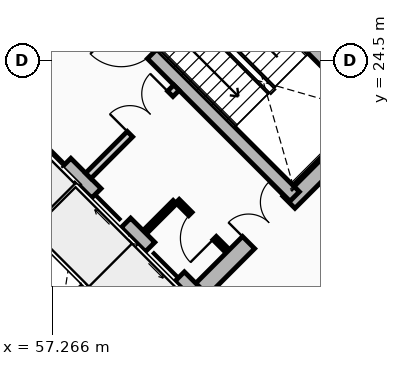
"""IFC4 building model, lengths in metres.
Left out: names, types, materials, properties, quantities, classifications, styles, units other than length and angle.
Written with IfcOpenShell. Run it as: python <this file> out.ifc"""

import sys

from ifc_helpers import new_model, si_unit, direction, frame, frame_2d, origin, place, context, subcontext, project, spatial, rectangle, extrude, source, transform, mapped, element, fill, save


model = new_model("IFC4")
c1 = context("Model", 3, precision=1e-05, world=origin(), true_north=direction((0.0, 1.0)))
c2 = subcontext(c1, "Body", "Model", "MODEL_VIEW")
j1 = project(units=[si_unit("LENGTHUNIT", "METRE"), si_unit("PLANEANGLEUNIT", "RADIAN")], contexts=[c1])
p1 = place(None, origin())
s1 = spatial("IfcSite", under=j1, at=p1, CompositionType="ELEMENT")
p2 = place(p1, origin())
s2 = spatial("IfcBuilding", under=s1, at=p2, CompositionType="ELEMENT")
p3 = place(p2, frame((0.0, 0.0, 136.6)))
s3 = spatial("IfcBuildingStorey", under=s2, at=p3, CompositionType="ELEMENT", Elevation=136.6)
for number, where, z_axis, x_axis in (
    (1, (58.737, 15.697, 0.0), (0.0, 0.0, 1.0), (-0.707, 0.707, 0.0)),
    (2, (66.303, 23.263, 0.0), (0.0, 0.0, 1.0), (-0.707, 0.707, 0.0)),
):
    element("IfcWall", number, at=place(p3, frame(where, z_axis=z_axis, x_axis=x_axis)), inside=s3, PredefinedType="SHEAR", context=c2, shape_type="SweptSolid", body=[
        extrude(rectangle(XDim=14.2, YDim=0.45, at=frame_2d((7.1, 0.0))), origin(), (0.0, 0.0, 1.0), 3.72),
    ])
p4 = place(p3, frame((58.578, 15.856, 0.0), z_axis=(0.0, 0.0, 1.0), x_axis=(0.707106781187, 0.707106781187, 0.0)))
e3 = element("IfcWall", 3, at=p4, inside=s3, PredefinedType="SHEAR", context=c2, shape_type="SweptSolid", body=[
    extrude(rectangle(XDim=10.7, YDim=0.45, at=frame_2d((5.35, 0.0))), origin(), (0.0, 0.0, 1.0), 3.72),
])
m1 = source(origin(), c2, "Body", "SweptSolid", [
    extrude(rectangle(XDim=1.5, YDim=2.02, at=frame_2d((0.75, 1.01))), frame((0.0, 0.235, 0.0), z_axis=(0.0, -1.0, 0.0), x_axis=(1.0, 0.0, 0.0)), (0.0, 0.0, 1.0), 0.47),
])
p5 = place(p4, frame((5.45, 0.0, 0.0)))
e4 = element("IfcOpeningElement", 4, at=p5, cuts=e3, PredefinedType="OPENING", context=c2, shape_type="MappedRepresentation", body=[
    mapped(m1, transform((0.0, 0.0, 0.0), x_axis=(1.0, 0.0, 0.0), y_axis=(0.0, 1.0, 0.0), z_axis=(0.0, 0.0, 1.0), scale=1.0)),
])
p6 = place(p3, frame((61.078, 18.355, 0.0), z_axis=(0.0, 0.0, 1.0), x_axis=(-0.707106781187, 0.707106781187, 0.0)))
e5 = element("IfcWall", 5, at=p6, inside=s3, PredefinedType="SHEAR", context=c2, shape_type="SweptSolid", body=[
    extrude(rectangle(XDim=13.75, YDim=0.35, at=frame_2d((6.875, 0.0))), origin(), (0.0, 0.0, 1.0), 3.72),
])
m2 = source(origin(), c2, "Body", "SweptSolid", [
    extrude(rectangle(XDim=1.1, YDim=2.015, at=frame_2d((0.55, 1.007))), frame((0.0, 0.185, 0.0), z_axis=(0.0, -1.0, 0.0), x_axis=(1.0, 0.0, 0.0)), (0.0, 0.0, 1.0), 0.37),
])
p7 = place(p6, frame((4.875, 0.0, 0.0)))
e6 = element("IfcOpeningElement", 6, at=p7, cuts=e5, PredefinedType="OPENING", context=c2, shape_type="MappedRepresentation", body=[
    mapped(m2, transform((0.0, 0.0, 0.0), x_axis=(1.0, 0.0, 0.0), y_axis=(0.0, 1.0, 0.0), z_axis=(0.0, 0.0, 1.0), scale=1.0)),
])
p8 = place(p6, frame((0.65, 0.0, 0.0)))
e7 = element("IfcOpeningElement", 7, at=p8, cuts=e5, PredefinedType="OPENING", context=c2, shape_type="MappedRepresentation", body=[
    mapped(m2, transform((0.0, 0.0, 0.0), x_axis=(1.0, 0.0, 0.0), y_axis=(0.0, 1.0, 0.0), z_axis=(0.0, 0.0, 1.0), scale=1.0)),
])
p9 = place(p6, frame((2.65, 0.0, 0.0)))
e8 = element("IfcOpeningElement", 8, at=p9, cuts=e5, PredefinedType="OPENING", context=c2, shape_type="MappedRepresentation", body=[
    mapped(m2, transform((0.0, 0.0, 0.0), x_axis=(1.0, 0.0, 0.0), y_axis=(0.0, 1.0, 0.0), z_axis=(0.0, 0.0, 1.0), scale=1.0)),
])
m3 = source(origin(), c2, "Body", "SweptSolid", [
    extrude(rectangle(XDim=1.15, YDim=2.02, at=frame_2d((0.575, 1.01))), frame((0.0, 0.185, 0.0), z_axis=(0.0, -1.0, 0.0), x_axis=(1.0, 0.0, 0.0)), (0.0, 0.0, 1.0), 0.37),
])
p10 = place(p6, frame((7.295, 0.0, 0.0)))
e9 = element("IfcOpeningElement", 9, at=p10, cuts=e5, PredefinedType="OPENING", context=c2, shape_type="MappedRepresentation", body=[
    mapped(m3, transform((0.0, 0.0, 0.0), x_axis=(1.0, 0.0, 0.0), y_axis=(0.0, 1.0, 0.0), z_axis=(0.0, 0.0, 1.0), scale=1.0)),
])
p11 = place(p3, frame((63.645, 20.922, 0.0), z_axis=(0.0, 0.0, 1.0), x_axis=(-0.70711946392, 0.707094098226, 0.0)))
e10 = element("IfcWall", 10, at=p11, inside=s3, PredefinedType="SHEAR", context=c2, shape_type="SweptSolid", body=[
    extrude(rectangle(XDim=9.625, YDim=0.35, at=frame_2d((4.812, 0.0))), origin(), (0.0, 0.0, 1.0), 3.72),
])
p12 = place(p11, frame((5.305, 0.0, 0.0)))
e11 = element("IfcOpeningElement", 11, at=p12, cuts=e10, PredefinedType="OPENING", context=c2, shape_type="MappedRepresentation", body=[
    mapped(m3, transform((0.0, 0.0, 0.0), x_axis=(1.0, 0.0, 0.0), y_axis=(0.0, 1.0, 0.0), z_axis=(0.0, 0.0, 1.0), scale=1.0)),
])
p13 = place(p3, frame((65.83, 23.107, 0.0), z_axis=(0.0, 0.0, 1.0), x_axis=(-0.707088616009, 0.707124945897, 0.0)))
e12 = element("IfcWall", 12, at=p13, inside=s3, PredefinedType="SHEAR", context=c2, shape_type="SweptSolid", body=[
    extrude(rectangle(XDim=6.72, YDim=0.35, at=frame_2d((3.36, 0.0))), origin(), (0.0, 0.0, 1.0), 3.72),
])
p14 = place(p3, frame((55.888, 19.069, 0.0), z_axis=(0.0, 0.0, 1.0), x_axis=(0.707106781187, 0.707106781187, 0.0)))
e13 = element("IfcWall", 13, at=p14, inside=s3, PredefinedType="SHEAR", context=c2, shape_type="SweptSolid", body=[
    extrude(rectangle(XDim=2.97, YDim=0.2, at=frame_2d((1.485, 0.0))), origin(), (0.0, 0.0, 1.0), 3.72),
])
p15 = place(p3, frame((57.284, 17.673, 0.0), z_axis=(0.0, 0.0, 1.0), x_axis=(0.707147878904, 0.70706568108, 0.0)))
e14 = element("IfcWall", 14, at=p15, inside=s3, PredefinedType="SHEAR", context=c2, shape_type="SweptSolid", body=[
    extrude(rectangle(XDim=2.97, YDim=0.2, at=frame_2d((1.485, 0.0))), origin(), (0.0, 0.0, 1.0), 3.72),
])
p16 = place(p3, frame((57.412, 17.97, 0.0), z_axis=(0.0, 0.0, 1.0), x_axis=(-0.707106781187, 0.707106781187, 0.0)))
e15 = element("IfcWall", 15, at=p16, inside=s3, PredefinedType="SHEAR", context=c2, shape_type="SweptSolid", body=[
    extrude(rectangle(XDim=1.735, YDim=0.2, at=frame_2d((0.867, 0.0))), origin(), (0.0, 0.0, 1.0), 3.72),
])
p17 = place(p3, frame((58.214, 21.467, 0.0), z_axis=(0.0, 0.0, 1.0), x_axis=(0.707106781187, 0.707106781187, 0.0)))
e16 = element("IfcWall", 16, at=p17, inside=s3, PredefinedType="PARTITIONING", context=c2, shape_type="SweptSolid", body=[
    extrude(rectangle(XDim=3.28, YDim=0.2, at=frame_2d((1.64, 0.0))), origin(), (0.0, 0.0, 1.0), 3.425),
])
m4 = source(origin(), c2, "Body", "SweptSolid", [
    extrude(rectangle(XDim=1.5, YDim=2.02, at=frame_2d((0.75, 1.01))), frame((0.0, 0.11, 0.0), z_axis=(0.0, -1.0, 0.0), x_axis=(1.0, 0.0, 0.0)), (0.0, 0.0, 1.0), 0.22),
])
p18 = place(p17, frame((1.55, 0.0, 0.0)))
e17 = element("IfcOpeningElement", 17, at=p18, cuts=e16, PredefinedType="OPENING", context=c2, shape_type="MappedRepresentation", body=[
    mapped(m4, transform((0.0, 0.0, 0.0), x_axis=(1.0, 0.0, 0.0), y_axis=(0.0, 1.0, 0.0), z_axis=(0.0, 0.0, 1.0), scale=1.0)),
])
p19 = place(p3, frame((54.961, 24.719, 0.0), z_axis=(0.0, 0.0, 1.0), x_axis=(0.707106781187, 0.707106781187, 0.0)))
e18 = element("IfcWall", 18, at=p19, inside=s3, PredefinedType="PARTITIONING", context=c2, shape_type="SweptSolid", body=[
    extrude(rectangle(XDim=3.28, YDim=0.2, at=frame_2d((1.64, 0.0))), origin(), (0.0, 0.0, 1.0), 3.425),
])
m5 = source(origin(), c2, "Body", "SweptSolid", [
    extrude(rectangle(XDim=0.9, YDim=2.005, at=frame_2d((0.45, 1.002))), frame((0.0, 0.11, 0.0), z_axis=(0.0, -1.0, 0.0), x_axis=(1.0, 0.0, 0.0)), (0.0, 0.0, 1.0), 0.22),
])
p20 = place(p19, frame((0.16, 0.0, 0.0)))
e19 = element("IfcOpeningElement", 19, at=p20, cuts=e18, PredefinedType="OPENING", context=c2, shape_type="MappedRepresentation", body=[
    mapped(m5, transform((0.0, 0.0, 0.0), x_axis=(1.0, 0.0, 0.0), y_axis=(0.0, 1.0, 0.0), z_axis=(0.0, 0.0, 1.0), scale=1.0)),
])
p21 = place(p3, frame((61.835, 19.529, 0.0), z_axis=(0.0, 0.0, 1.0), x_axis=(-0.707174592913, 0.707038962956, 0.0)))
e20 = element("IfcWall", 20, at=p21, inside=s3, PredefinedType="PARTITIONING", context=c2, shape_type="SweptSolid", body=[
    extrude(rectangle(XDim=1.8, YDim=0.125, at=frame_2d((0.9, 0.0))), origin(), (0.0, 0.0, 1.0), 3.425),
])
m6 = source(origin(), c2, "Body", "SweptSolid", [
    extrude(rectangle(XDim=0.9, YDim=2.005, at=frame_2d((0.45, 1.002))), frame((0.0, 0.073, 0.0), z_axis=(0.0, -1.0, 0.0), x_axis=(1.0, 0.0, 0.0)), (0.0, 0.0, 1.0), 0.145),
])
p22 = place(p21, frame((0.42, 0.0, 0.0)))
e21 = element("IfcOpeningElement", 21, at=p22, cuts=e20, PredefinedType="OPENING", context=c2, shape_type="MappedRepresentation", body=[
    mapped(m6, transform((0.0, 0.0, 0.0), x_axis=(1.0, 0.0, 0.0), y_axis=(0.0, 1.0, 0.0), z_axis=(0.0, 0.0, 1.0), scale=1.0)),
])
p23 = place(p3, frame((59.713, 19.996, 0.0), z_axis=(0.0, 0.0, 1.0), x_axis=(0.707217726, 0.706995818963, 0.0)))
e22 = element("IfcWall", 22, at=p23, inside=s3, PredefinedType="PARTITIONING", context=c2, shape_type="SweptSolid", body=[
    extrude(rectangle(XDim=1.1, YDim=0.125, at=frame_2d((0.55, 0.0))), origin(), (0.0, 0.0, 1.0), 3.425),
])
p24 = place(p3, frame((62.839, 16.745, 0.0), z_axis=(0.0, 0.0, 1.0), x_axis=(0.682386779427, 0.73099130177, 0.0)))
e23 = element("IfcWall", 23, at=p24, inside=s3, PredefinedType="PARTITIONING", context=c2, shape_type="SweptSolid", body=[
    extrude(rectangle(XDim=6.6, YDim=0.15, at=frame_2d((3.3, 0.0))), origin(), (0.0, 0.0, 1.0), 2.995),
])
m7 = source(origin(), c2, "Body", "SweptSolid", [
    extrude(rectangle(XDim=1.1, YDim=2.015, at=frame_2d((0.55, 1.007))), frame((0.0, 0.025, 0.0), z_axis=(0.0, -1.0, 0.0), x_axis=(1.0, 0.0, 0.0)), (0.0, 0.0, 1.0), 0.05),
])
p25 = place(p7, origin())
e24 = element("IfcDoor", 24, at=p25, inside=s3, OperationType="SLIDING_TO_LEFT", PredefinedType="DOOR", context=c2, shape_type="MappedRepresentation", body=[
    mapped(m7, transform((0.0, 0.0, 0.0), x_axis=(1.0, 0.0, 0.0), y_axis=(0.0, 1.0, 0.0), z_axis=(0.0, 0.0, 1.0), scale=1.0)),
])
fill(e6, e24)
p26 = place(p8, origin())
e25 = element("IfcDoor", 25, at=p26, inside=s3, OperationType="SLIDING_TO_LEFT", PredefinedType="DOOR", context=c2, shape_type="MappedRepresentation", body=[
    mapped(m7, transform((0.0, 0.0, 0.0), x_axis=(1.0, 0.0, 0.0), y_axis=(0.0, 1.0, 0.0), z_axis=(0.0, 0.0, 1.0), scale=1.0)),
])
fill(e7, e25)
p27 = place(p9, origin())
e26 = element("IfcDoor", 26, at=p27, inside=s3, OperationType="SLIDING_TO_RIGHT", PredefinedType="DOOR", context=c2, shape_type="MappedRepresentation", body=[
    mapped(m7, transform((0.0, 0.0, 0.0), x_axis=(1.0, 0.0, 0.0), y_axis=(0.0, 1.0, 0.0), z_axis=(0.0, 0.0, 1.0), scale=1.0)),
])
fill(e8, e26)
m8 = source(origin(), c2, "Body", "SweptSolid", [
    extrude(rectangle(XDim=1.15, YDim=2.02, at=frame_2d((0.575, 1.01))), frame((0.0, 0.025, 0.0), z_axis=(0.0, -1.0, 0.0), x_axis=(1.0, 0.0, 0.0)), (0.0, 0.0, 1.0), 0.05),
])
p28 = place(p12, origin())
e27 = element("IfcDoor", 27, at=p28, inside=s3, OperationType="SINGLE_SWING_RIGHT", PredefinedType="DOOR", context=c2, shape_type="MappedRepresentation", body=[
    mapped(m8, transform((0.0, 0.0, 0.0), x_axis=(1.0, 0.0, 0.0), y_axis=(0.0, 1.0, 0.0), z_axis=(0.0, 0.0, 1.0), scale=1.0)),
])
fill(e11, e27)
m9 = source(origin(), c2, "Body", "SweptSolid", [
    extrude(rectangle(XDim=1.5, YDim=2.02, at=frame_2d((0.75, 1.01))), frame((0.0, 0.025, 0.0), z_axis=(0.0, -1.0, 0.0), x_axis=(1.0, 0.0, 0.0)), (0.0, 0.0, 1.0), 0.05),
])
p29 = place(p5, origin())
e28 = element("IfcDoor", 28, at=p29, inside=s3, OperationType="DOUBLE_DOOR_SINGLE_SWING", PredefinedType="DOOR", context=c2, shape_type="MappedRepresentation", body=[
    mapped(m9, transform((0.0, 0.0, 0.0), x_axis=(1.0, 0.0, 0.0), y_axis=(0.0, 1.0, 0.0), z_axis=(0.0, 0.0, 1.0), scale=1.0)),
])
fill(e4, e28)
p30 = place(p18, origin())
e29 = element("IfcDoor", 29, at=p30, inside=s3, OperationType="DOUBLE_DOOR_SINGLE_SWING", PredefinedType="DOOR", context=c2, shape_type="MappedRepresentation", body=[
    mapped(m9, transform((0.0, 0.0, 0.0), x_axis=(1.0, 0.0, 0.0), y_axis=(0.0, 1.0, 0.0), z_axis=(0.0, 0.0, 1.0), scale=1.0)),
])
fill(e17, e29)
m10 = source(origin(), c2, "Body", "SweptSolid", [
    extrude(rectangle(XDim=0.9, YDim=2.005, at=frame_2d((0.45, 1.002))), frame((0.0, 0.025, 0.0), z_axis=(0.0, -1.0, 0.0), x_axis=(1.0, 0.0, 0.0)), (0.0, 0.0, 1.0), 0.05),
])
p31 = place(p22, origin())
e30 = element("IfcDoor", 30, at=p31, inside=s3, OperationType="SINGLE_SWING_LEFT", PredefinedType="DOOR", context=c2, shape_type="MappedRepresentation", body=[
    mapped(m10, transform((0.0, 0.0, 0.0), x_axis=(1.0, 0.0, 0.0), y_axis=(0.0, 1.0, 0.0), z_axis=(0.0, 0.0, 1.0), scale=1.0)),
])
fill(e21, e30)
save(model, sys.argv[1])
